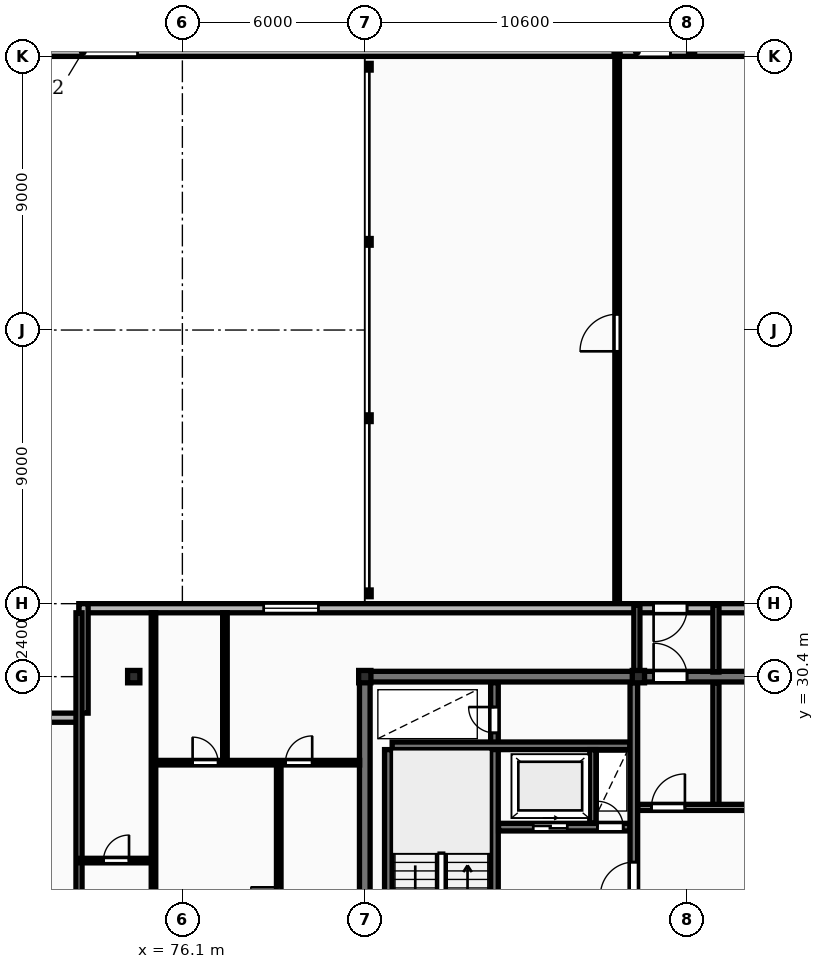
"""IFC4 building model, lengths in metres.
Left out: names, types, materials, properties, quantities, classifications, styles, units other than length and angle.
Written with IfcOpenShell. Run it as: python <this file> out.ifc"""

import sys

from ifc_helpers import new_model, si_unit, direction, frame, frame_2d, origin, origin_2d, place, context, subcontext, project, spatial, rectangle, i_section, extrude, element, fill, save


model = new_model("IFC4")
c1 = context("Model", 3, precision=1e-05, world=origin(), true_north=direction((0.0, 1.0)))
c2 = subcontext(c1, "Body", "Model", "MODEL_VIEW")
j1 = project(units=[si_unit("LENGTHUNIT", "METRE"), si_unit("PLANEANGLEUNIT", "RADIAN")], contexts=[c1])
p1 = place(None, origin())
s1 = spatial("IfcSite", under=j1, at=p1, CompositionType="ELEMENT")
p2 = place(p1, origin())
s2 = spatial("IfcBuilding", under=s1, at=p2, CompositionType="ELEMENT")
p3 = place(p2, frame((0.0, 0.0, 139.3)))
s3 = spatial("IfcBuildingStorey", under=s2, at=p3, CompositionType="ELEMENT", Elevation=139.3)
for number, where, z_axis, x_axis in (
    (1, (74.5, 30.4, 0.0), (0.0, 0.0, 1.0), (1.0, 0.0, 0.0)),
    (2, (82.1, 30.4, 0.0), (0.0, 0.0, 1.0), (1.0, 0.0, 0.0)),
    (3, (91.1, 30.4, 0.0), (0.0, 0.0, 1.0), (1.0, 0.0, 0.0)),
):
    element("IfcColumn", number, at=place(p3, frame(where, z_axis=z_axis, x_axis=x_axis)), inside=s3, PredefinedType="COLUMN", context=c2, shape_type="SweptSolid", body=[
        extrude(i_section(OverallWidth=0.403, OverallDepth=0.406, WebThickness=0.027, FlangeThickness=0.043, FilletRadius=0.015, at=origin_2d()), origin(), (0.0, 0.0, 1.0), 3.6),
    ])
p4 = place(p3, frame((57.6, 50.95, 0.0), z_axis=(0.0, 0.0, 1.0), x_axis=(1.0, 0.0, 0.0)))
e4 = element("IfcWall", 4, at=p4, inside=s3, PredefinedType="STANDARD", context=c2, shape_type="SweptSolid", body=[
    extrude(rectangle(XDim=73.0, YDim=0.3, at=frame_2d((36.5, 0.0))), origin(), (0.0, 0.0, 1.0), 3.31),
])
p5 = place(p4, frame((15.225, 0.0, 0.85)))
e5 = element("IfcOpeningElement", 5, at=p5, cuts=e4, PredefinedType="OPENING", context=c2, shape_type="SweptSolid", body=[
    extrude(rectangle(XDim=1.8, YDim=1.8, at=frame_2d((0.9, 0.9))), frame((0.0, 0.16, 0.0), z_axis=(0.0, -1.0, 0.0), x_axis=(1.0, 0.0, 0.0)), (0.0, 0.0, 1.0), 0.32),
])
p6 = place(p4, frame((58.575, 0.0, 0.85)))
e6 = element("IfcOpeningElement", 6, at=p6, cuts=e4, PredefinedType="OPENING", context=c2, shape_type="SweptSolid", body=[
    extrude(rectangle(XDim=1.8, YDim=1.8, at=frame_2d((0.9, 0.9))), frame((0.0, 0.16, 0.0), z_axis=(0.0, -1.0, 0.0), x_axis=(1.0, 0.0, 0.0)), (0.0, 0.0, 1.0), 0.32),
])
p7 = place(p4, frame((33.45, 0.0, 0.0)))
e7 = element("IfcOpeningElement", 7, at=p7, cuts=e4, PredefinedType="OPENING", context=c2, shape_type="SweptSolid", body=[
    extrude(rectangle(XDim=1.1, YDim=2.1, at=frame_2d((0.55, 1.05))), frame((0.0, 0.16, 0.0), z_axis=(0.0, -1.0, 0.0), x_axis=(1.0, 0.0, 0.0)), (0.0, 0.0, 1.0), 0.32),
])
p8 = place(p3, frame((130.7, 32.65, 0.0), z_axis=(0.0, 0.0, 1.0), x_axis=(-1.0, 0.0, 0.0)))
e8 = element("IfcWall", 8, at=p8, inside=s3, PredefinedType="STANDARD", context=c2, shape_type="SweptSolid", body=[
    extrude(rectangle(XDim=58.0, YDim=0.3, at=frame_2d((29.0, 0.0))), origin(), (0.0, 0.0, 1.0), 3.31),
])
p9 = place(p8, frame((50.125, 0.0, 0.85)))
e9 = element("IfcOpeningElement", 9, at=p9, cuts=e8, PredefinedType="OPENING", context=c2, shape_type="SweptSolid", body=[
    extrude(rectangle(XDim=1.8, YDim=1.8, at=frame_2d((0.9, 0.9))), frame((0.0, 0.16, 0.0), z_axis=(0.0, -1.0, 0.0), x_axis=(1.0, 0.0, 0.0)), (0.0, 0.0, 1.0), 0.32),
])
p10 = place(p8, frame((6.775, 0.0, 0.85)))
e10 = element("IfcOpeningElement", 10, at=p10, cuts=e8, PredefinedType="OPENING", context=c2, shape_type="SweptSolid", body=[
    extrude(rectangle(XDim=1.8, YDim=1.8, at=frame_2d((0.9, 0.9))), frame((0.0, 0.16, 0.0), z_axis=(0.0, -1.0, 0.0), x_axis=(1.0, 0.0, 0.0)), (0.0, 0.0, 1.0), 0.32),
])
p11 = place(p8, frame((38.0, 0.0, 0.0)))
e11 = element("IfcOpeningElement", 11, at=p11, cuts=e8, PredefinedType="OPENING", context=c2, shape_type="SweptSolid", body=[
    extrude(rectangle(XDim=1.1, YDim=2.1, at=frame_2d((0.55, 1.05))), frame((0.0, 0.16, 0.0), z_axis=(0.0, -1.0, 0.0), x_axis=(1.0, 0.0, 0.0)), (0.0, 0.0, 1.0), 0.32),
])
p12 = place(p3, frame((72.85, 32.8, 0.0), z_axis=(0.0, 0.0, 1.0), x_axis=(0.0, -1.0, 0.0)))
e12 = element("IfcWall", 12, at=p12, inside=s3, PredefinedType="STANDARD", context=c2, shape_type="SweptSolid", body=[
    extrude(rectangle(XDim=3.6, YDim=0.3, at=frame_2d((1.8, 0.0))), origin(), (0.0, 0.0, 1.0), 3.31),
])
p13 = place(p3, frame((72.7, 29.05, 0.0), z_axis=(0.0, 0.0, 1.0), x_axis=(-1.0, 0.0, 0.0)))
e13 = element("IfcWall", 13, at=p13, inside=s3, PredefinedType="STANDARD", context=c2, shape_type="SweptSolid", body=[
    extrude(rectangle(XDim=3.6, YDim=0.3, at=frame_2d((1.8, 0.0))), origin(), (0.0, 0.0, 1.0), 3.31),
])
for number, where, z_axis, x_axis in (
    (14, (90.4, 50.85, 0.0), (0.0, 0.0, 1.0), (0.0, 1.0, 0.0)),
    (15, (92.85, 50.85, 0.0), (0.0, 0.0, 1.0), (0.0, 1.0, 0.0)),
):
    element("IfcWall", number, at=place(p3, frame(where, z_axis=z_axis, x_axis=x_axis)), inside=s3, PredefinedType="PARTITIONING", context=c2, shape_type="SweptSolid", body=[
        extrude(rectangle(XDim=4.2, YDim=0.2, at=frame_2d((2.1, 0.0))), origin(), (0.0, 0.0, 1.0), 3.31),
    ])
p14 = place(p3, frame((81.925, 30.4, 0.0), z_axis=(0.0, 0.0, 1.0), x_axis=(1.0, 0.0, 0.0)))
e16 = element("IfcWall", 16, at=p14, inside=s3, PredefinedType="SHEAR", context=c2, shape_type="SweptSolid", body=[
    extrude(rectangle(XDim=36.265, YDim=0.35, at=frame_2d((18.132, 0.0))), origin(), (0.0, 0.0, 1.0), 3.6),
])
p15 = place(p14, frame((9.675, 0.0, 0.0)))
e17 = element("IfcOpeningElement", 17, at=p15, cuts=e16, PredefinedType="OPENING", context=c2, shape_type="SweptSolid", body=[
    extrude(rectangle(XDim=1.1, YDim=2.1, at=frame_2d((0.55, 1.05))), frame((0.0, 0.185, 0.0), z_axis=(0.0, -1.0, 0.0), x_axis=(1.0, 0.0, 0.0)), (0.0, 0.0, 1.0), 0.37),
])
p16 = place(p3, frame((82.1, 18.575, 0.0), z_axis=(0.0, 0.0, 1.0), x_axis=(0.0, 1.0, 0.0)))
e18 = element("IfcWall", 18, at=p16, inside=s3, PredefinedType="SHEAR", context=c2, shape_type="SweptSolid", body=[
    extrude(rectangle(XDim=11.65, YDim=0.35, at=frame_2d((5.825, 0.0))), origin(), (0.0, 0.0, 1.0), 3.6),
])
p17 = place(p3, frame((82.875, 20.4, 0.0), z_axis=(0.0, 0.0, 1.0), x_axis=(0.0, 1.0, 0.0)))
e19 = element("IfcWall", 19, at=p17, inside=s3, PredefinedType="SHEAR", context=c2, shape_type="SweptSolid", body=[
    extrude(rectangle(XDim=7.6, YDim=0.25, at=frame_2d((3.8, 0.0))), origin(), (0.0, 0.0, 1.0), 3.6),
])
p18 = place(p3, frame((86.365, 18.6, 0.0), z_axis=(0.0, 0.0, 1.0), x_axis=(0.0, 1.0, 0.0)))
e20 = element("IfcWall", 20, at=p18, inside=s3, PredefinedType="SHEAR", context=c2, shape_type="SweptSolid", body=[
    extrude(rectangle(XDim=11.6, YDim=0.25, at=frame_2d((5.8, 0.0))), origin(), (0.0, 0.0, 1.0), 3.6),
])
p19 = place(p18, frame((0.45, 0.0, 0.0)))
e21 = element("IfcOpeningElement", 21, at=p19, cuts=e20, PredefinedType="OPENING", context=c2, shape_type="SweptSolid", body=[
    extrude(rectangle(XDim=0.85, YDim=2.05, at=frame_2d((0.425, 1.025))), frame((0.0, 0.135, 0.0), z_axis=(0.0, -1.0, 0.0), x_axis=(1.0, 0.0, 0.0)), (0.0, 0.0, 1.0), 0.27),
])
p20 = place(p18, frame((2.05, 0.0, 0.0)))
e22 = element("IfcOpeningElement", 22, at=p20, cuts=e20, PredefinedType="OPENING", context=c2, shape_type="SweptSolid", body=[
    extrude(rectangle(XDim=1.1, YDim=2.1, at=frame_2d((0.55, 1.05))), frame((0.0, 0.135, 0.0), z_axis=(0.0, -1.0, 0.0), x_axis=(1.0, 0.0, 0.0)), (0.0, 0.0, 1.0), 0.27),
])
p21 = place(p18, frame((9.95, 0.0, 0.0)))
e23 = element("IfcOpeningElement", 23, at=p21, cuts=e20, PredefinedType="OPENING", context=c2, shape_type="SweptSolid", body=[
    extrude(rectangle(XDim=0.85, YDim=2.05, at=frame_2d((0.425, 1.025))), frame((0.0, 0.135, 0.0), z_axis=(0.0, -1.0, 0.0), x_axis=(1.0, 0.0, 0.0)), (0.0, 0.0, 1.0), 0.27),
])
p22 = place(p3, frame((83.0, 28.125, 0.0), z_axis=(0.0, 0.0, 1.0), x_axis=(1.0, 0.0, 0.0)))
e24 = element("IfcWall", 24, at=p22, inside=s3, PredefinedType="SHEAR", context=c2, shape_type="SweptSolid", body=[
    extrude(rectangle(XDim=7.82, YDim=0.25, at=frame_2d((3.91, 0.0))), origin(), (0.0, 0.0, 1.0), 3.6),
])
p23 = place(p3, frame((86.5, 25.45, 0.0), z_axis=(0.0, 0.0, 1.0), x_axis=(1.0, 0.0, 0.0)))
e25 = element("IfcWall", 25, at=p23, inside=s3, PredefinedType="SHEAR", context=c2, shape_type="SweptSolid", body=[
    extrude(rectangle(XDim=4.32, YDim=0.25, at=frame_2d((2.16, 0.0))), origin(), (0.0, 0.0, 1.0), 3.6),
])
p24 = place(p23, frame((1.14, 0.0, 0.0)))
e26 = element("IfcOpeningElement", 26, at=p24, cuts=e25, PredefinedType="OPENING", context=c2, shape_type="SweptSolid", body=[
    extrude(rectangle(XDim=1.12, YDim=2.12, at=frame_2d((0.56, 1.06))), frame((0.0, 0.135, 0.0), z_axis=(0.0, -1.0, 0.0), x_axis=(1.0, 0.0, 0.0)), (0.0, 0.0, 1.0), 0.27),
])
p25 = place(p23, frame((3.25, 0.0, 0.0)))
e27 = element("IfcOpeningElement", 27, at=p25, cuts=e25, PredefinedType="OPENING", context=c2, shape_type="SweptSolid", body=[
    extrude(rectangle(XDim=0.85, YDim=2.05, at=frame_2d((0.425, 1.025))), frame((0.0, 0.135, 0.0), z_axis=(0.0, -1.0, 0.0), x_axis=(1.0, 0.0, 0.0)), (0.0, 0.0, 1.0), 0.27),
])
p26 = place(p3, frame((89.6, 25.58, 0.0), z_axis=(0.0, 0.0, 1.0), x_axis=(0.0, 1.0, 0.0)))
e28 = element("IfcWall", 28, at=p26, inside=s3, PredefinedType="PARTITIONING", context=c2, shape_type="SweptSolid", body=[
    extrude(rectangle(XDim=2.42, YDim=0.2, at=frame_2d((1.21, 0.0))), origin(), (0.0, 0.0, 1.0), 3.31),
])
p27 = place(p3, frame((90.95, 18.6, 0.0), z_axis=(0.0, 0.0, 1.0), x_axis=(0.0, 1.0, 0.0)))
e29 = element("IfcWall", 29, at=p27, inside=s3, PredefinedType="SHEAR", context=c2, shape_type="SweptSolid", body=[
    extrude(rectangle(XDim=11.6, YDim=0.25, at=frame_2d((5.8, 0.0))), origin(), (0.0, 0.0, 1.0), 3.6),
])
p28 = place(p27, frame((4.6, 0.0, 0.0)))
e30 = element("IfcOpeningElement", 30, at=p28, cuts=e29, PredefinedType="OPENING", context=c2, shape_type="SweptSolid", body=[
    extrude(rectangle(XDim=1.1, YDim=2.1, at=frame_2d((0.55, 1.05))), frame((0.0, 0.135, 0.0), z_axis=(0.0, -1.0, 0.0), x_axis=(1.0, 0.0, 0.0)), (0.0, 0.0, 1.0), 0.27),
])
p29 = place(p3, frame((93.65, 26.1, 0.0), z_axis=(0.0, 0.0, 1.0), x_axis=(0.0, 1.0, 0.0)))
e31 = element("IfcWall", 31, at=p29, inside=s3, PredefinedType="PARTITIONING", context=c2, shape_type="SweptSolid", body=[
    extrude(rectangle(XDim=4.1, YDim=0.2, at=frame_2d((2.05, 0.0))), origin(), (0.0, 0.0, 1.0), 3.31),
])
p30 = place(p3, frame((91.08, 26.1, 0.0), z_axis=(0.0, 0.0, 1.0), x_axis=(1.0, 0.0, 0.0)))
e32 = element("IfcWall", 32, at=p30, inside=s3, PredefinedType="PARTITIONING", context=c2, shape_type="SweptSolid", body=[
    extrude(rectangle(XDim=8.34, YDim=0.2, at=frame_2d((4.17, 0.0))), origin(), (0.0, 0.0, 1.0), 3.31),
])
p31 = place(p30, frame((0.45, 0.0, 0.0)))
e33 = element("IfcOpeningElement", 33, at=p31, cuts=e32, PredefinedType="OPENING", context=c2, shape_type="SweptSolid", body=[
    extrude(rectangle(XDim=1.1, YDim=2.1, at=frame_2d((0.55, 1.05))), frame((0.0, 0.11, 0.0), z_axis=(0.0, -1.0, 0.0), x_axis=(1.0, 0.0, 0.0)), (0.0, 0.0, 1.0), 0.22),
])
p32 = place(p30, frame((4.6, 0.0, 0.0)))
e34 = element("IfcOpeningElement", 34, at=p32, cuts=e32, PredefinedType="OPENING", context=c2, shape_type="SweptSolid", body=[
    extrude(rectangle(XDim=0.92, YDim=2.08, at=frame_2d((0.46, 1.04))), frame((0.0, 0.11, 0.0), z_axis=(0.0, -1.0, 0.0), x_axis=(1.0, 0.0, 0.0)), (0.0, 0.0, 1.0), 0.22),
])
p33 = place(p3, frame((72.7, 18.4, 0.0), z_axis=(0.0, 0.0, 1.0), x_axis=(0.0, 1.0, 0.0)))
e35 = element("IfcWall", 35, at=p33, inside=s3, PredefinedType="PARTITIONING", context=c2, shape_type="SweptSolid", body=[
    extrude(rectangle(XDim=14.1, YDim=0.2, at=frame_2d((7.05, 0.0))), origin(), (0.0, 0.0, 1.0), 3.31),
])
p34 = place(p3, frame((72.7, 24.35, 0.0), z_axis=(0.0, 0.0, 1.0), x_axis=(1.0, 0.0, 0.0)))
e36 = element("IfcWall", 36, at=p34, inside=s3, PredefinedType="PARTITIONING", context=c2, shape_type="SweptSolid", body=[
    extrude(rectangle(XDim=2.45, YDim=0.15, at=frame_2d((1.225, 0.0))), origin(), (0.0, 0.0, 1.0), 3.31),
])
p35 = place(p34, frame((0.805, 0.0, 0.0)))
e37 = element("IfcOpeningElement", 37, at=p35, cuts=e36, PredefinedType="OPENING", context=c2, shape_type="SweptSolid", body=[
    extrude(rectangle(XDim=0.84, YDim=2.04, at=frame_2d((0.42, 1.02))), frame((0.0, 0.085, 0.0), z_axis=(0.0, -1.0, 0.0), x_axis=(1.0, 0.0, 0.0)), (0.0, 0.0, 1.0), 0.17),
])
p36 = place(p3, frame((75.15, 18.45, 0.0), z_axis=(0.0, 0.0, 1.0), x_axis=(0.0, 1.0, 0.0)))
e38 = element("IfcWall", 38, at=p36, inside=s3, PredefinedType="PARTITIONING", context=c2, shape_type="SweptSolid", body=[
    extrude(rectangle(XDim=14.05, YDim=0.15, at=frame_2d((7.025, 0.0))), origin(), (0.0, 0.0, 1.0), 3.31),
])
p37 = place(p36, frame((3.32, 0.0, 0.0)))
e39 = element("IfcOpeningElement", 39, at=p37, cuts=e38, PredefinedType="OPENING", context=c2, shape_type="SweptSolid", body=[
    extrude(rectangle(XDim=0.88, YDim=2.06, at=frame_2d((0.44, 1.03))), frame((0.0, 0.085, 0.0), z_axis=(0.0, -1.0, 0.0), x_axis=(1.0, 0.0, 0.0)), (0.0, 0.0, 1.0), 0.17),
])
p38 = place(p3, frame((79.27, 18.45, 0.0), z_axis=(0.0, 0.0, 1.0), x_axis=(0.0, 1.0, 0.0)))
e40 = element("IfcWall", 40, at=p38, inside=s3, PredefinedType="PARTITIONING", context=c2, shape_type="SweptSolid", body=[
    extrude(rectangle(XDim=9.12, YDim=0.15, at=frame_2d((4.56, 0.0))), origin(), (0.0, 0.0, 1.0), 3.31),
])
p39 = place(p38, frame((4.1, 0.0, 0.0)))
e41 = element("IfcOpeningElement", 41, at=p39, cuts=e40, PredefinedType="OPENING", context=c2, shape_type="SweptSolid", body=[
    extrude(rectangle(XDim=0.92, YDim=2.08, at=frame_2d((0.46, 1.04))), frame((0.0, 0.085, 0.0), z_axis=(0.0, -1.0, 0.0), x_axis=(1.0, 0.0, 0.0)), (0.0, 0.0, 1.0), 0.17),
])
p40 = place(p3, frame((77.5, 27.57, 0.0), z_axis=(0.0, 0.0, 1.0), x_axis=(0.0, 1.0, 0.0)))
e42 = element("IfcWall", 42, at=p40, inside=s3, PredefinedType="PARTITIONING", context=c2, shape_type="SweptSolid", body=[
    extrude(rectangle(XDim=4.93, YDim=0.15, at=frame_2d((2.465, 0.0))), origin(), (0.0, 0.0, 1.0), 3.31),
])
p41 = place(p3, frame((75.17, 27.57, 0.0), z_axis=(0.0, 0.0, 1.0), x_axis=(1.0, 0.0, 0.0)))
e43 = element("IfcWall", 43, at=p41, inside=s3, PredefinedType="PARTITIONING", context=c2, shape_type="SweptSolid", body=[
    extrude(rectangle(XDim=6.76, YDim=0.15, at=frame_2d((3.38, 0.0))), origin(), (0.0, 0.0, 1.0), 3.31),
])
p42 = place(p41, frame((1.266, 0.0, 0.0)))
e44 = element("IfcOpeningElement", 44, at=p42, cuts=e43, PredefinedType="OPENING", context=c2, shape_type="SweptSolid", body=[
    extrude(rectangle(XDim=0.84, YDim=2.04, at=frame_2d((0.42, 1.02))), frame((0.0, 0.085, 0.0), z_axis=(0.0, -1.0, 0.0), x_axis=(1.0, 0.0, 0.0)), (0.0, 0.0, 1.0), 0.17),
])
p43 = place(p41, frame((4.32, 0.0, 0.0)))
e45 = element("IfcOpeningElement", 45, at=p43, cuts=e43, PredefinedType="OPENING", context=c2, shape_type="SweptSolid", body=[
    extrude(rectangle(XDim=0.88, YDim=2.06, at=frame_2d((0.44, 1.03))), frame((0.0, 0.085, 0.0), z_axis=(0.0, -1.0, 0.0), x_axis=(1.0, 0.0, 0.0)), (0.0, 0.0, 1.0), 0.17),
])
p44 = place(p3, frame((91.05, 30.55, 0.0), z_axis=(0.0, 0.0, 1.0), x_axis=(0.0, 1.0, 0.0)))
e46 = element("IfcWall", 46, at=p44, inside=s3, PredefinedType="PARTITIONING", context=c2, shape_type="SweptSolid", body=[
    extrude(rectangle(XDim=2.2, YDim=0.2, at=frame_2d((1.1, 0.0))), origin(), (0.0, 0.0, 1.0), 3.31),
])
p45 = place(p3, frame((93.65, 30.55, 0.0), z_axis=(0.0, 0.0, 1.0), x_axis=(0.0, 1.0, 0.0)))
e47 = element("IfcWall", 47, at=p45, inside=s3, PredefinedType="PARTITIONING", context=c2, shape_type="SweptSolid", body=[
    extrude(rectangle(XDim=2.2, YDim=0.2, at=frame_2d((1.1, 0.0))), origin(), (0.0, 0.0, 1.0), 2.383),
])
p46 = place(p3, frame((90.4, 32.9, 0.0), z_axis=(0.0, 0.0, 1.0), x_axis=(0.0, 1.0, 0.0)))
e48 = element("IfcWall", 48, at=p46, inside=s3, PredefinedType="PARTITIONING", context=c2, shape_type="SweptSolid", body=[
    extrude(rectangle(XDim=17.8, YDim=0.15, at=frame_2d((8.9, 0.0))), origin(), (0.0, 0.0, 1.0), 3.31),
])
p47 = place(p46, frame((8.2, 0.0, 0.0)))
e49 = element("IfcOpeningElement", 49, at=p47, cuts=e48, PredefinedType="OPENING", context=c2, shape_type="SweptSolid", body=[
    extrude(rectangle(XDim=1.22, YDim=2.18, at=frame_2d((0.61, 1.09))), frame((0.0, 0.085, 0.0), z_axis=(0.0, -1.0, 0.0), x_axis=(1.0, 0.0, 0.0)), (0.0, 0.0, 1.0), 0.17),
])
p48 = place(p5, origin())
e50 = element("IfcWindow", 50, at=p48, inside=s3, PartitioningType="SINGLE_PANEL", PredefinedType="WINDOW", context=c2, shape_type="SweptSolid", body=[
    extrude(rectangle(XDim=1.8, YDim=1.8, at=frame_2d((0.9, 0.9))), frame((0.0, 0.03, 0.0), z_axis=(0.0, -1.0, 0.0), x_axis=(1.0, 0.0, 0.0)), (0.0, 0.0, 1.0), 0.06),
])
fill(e5, e50)
p49 = place(p7, origin())
e51 = element("IfcDoor", 51, at=p49, inside=s3, OperationType="SINGLE_SWING_LEFT", PredefinedType="DOOR", context=c2, shape_type="SweptSolid", body=[
    extrude(rectangle(XDim=1.1, YDim=2.1, at=frame_2d((0.55, 1.05))), frame((0.0, 0.025, 0.0), z_axis=(0.0, -1.0, 0.0), x_axis=(1.0, 0.0, 0.0)), (0.0, 0.0, 1.0), 0.05),
])
fill(e7, e51)
p50 = place(p9, origin())
e52 = element("IfcWindow", 52, at=p50, inside=s3, PartitioningType="SINGLE_PANEL", PredefinedType="WINDOW", context=c2, shape_type="SweptSolid", body=[
    extrude(rectangle(XDim=1.8, YDim=1.8, at=frame_2d((0.9, 0.9))), frame((0.0, 0.03, 0.0), z_axis=(0.0, -1.0, 0.0), x_axis=(1.0, 0.0, 0.0)), (0.0, 0.0, 1.0), 0.06),
])
fill(e9, e52)
p51 = place(p11, origin())
e53 = element("IfcDoor", 53, at=p51, inside=s3, OperationType="SINGLE_SWING_RIGHT", PredefinedType="DOOR", context=c2, shape_type="SweptSolid", body=[
    extrude(rectangle(XDim=1.1, YDim=2.1, at=frame_2d((0.55, 1.05))), frame((0.0, 0.025, 0.0), z_axis=(0.0, -1.0, 0.0), x_axis=(1.0, 0.0, 0.0)), (0.0, 0.0, 1.0), 0.05),
])
fill(e11, e53)
p52 = place(p15, origin())
e54 = element("IfcDoor", 54, at=p52, inside=s3, OperationType="SINGLE_SWING_LEFT", PredefinedType="DOOR", context=c2, shape_type="SweptSolid", body=[
    extrude(rectangle(XDim=1.1, YDim=2.1, at=frame_2d((0.55, 1.05))), frame((0.0, 0.025, 0.0), z_axis=(0.0, -1.0, 0.0), x_axis=(1.0, 0.0, 0.0)), (0.0, 0.0, 1.0), 0.05),
])
fill(e17, e54)
p53 = place(p21, origin())
e55 = element("IfcDoor", 55, at=p53, inside=s3, OperationType="SINGLE_SWING_RIGHT", PredefinedType="DOOR", context=c2, shape_type="SweptSolid", body=[
    extrude(rectangle(XDim=0.85, YDim=2.05, at=frame_2d((0.425, 1.025))), frame((0.0, 0.025, 0.0), z_axis=(0.0, -1.0, 0.0), x_axis=(1.0, 0.0, 0.0)), (0.0, 0.0, 1.0), 0.05),
])
fill(e23, e55)
p54 = place(p24, origin())
e56 = element("IfcDoor", 56, at=p54, inside=s3, OperationType="SLIDING_TO_RIGHT", PredefinedType="DOOR", context=c2, shape_type="SweptSolid", body=[
    extrude(rectangle(XDim=1.12, YDim=2.12, at=frame_2d((0.56, 1.06))), frame((0.0, 0.025, 0.0), z_axis=(0.0, -1.0, 0.0), x_axis=(1.0, 0.0, 0.0)), (0.0, 0.0, 1.0), 0.05),
])
fill(e26, e56)
p55 = place(p25, origin())
e57 = element("IfcDoor", 57, at=p55, inside=s3, OperationType="SINGLE_SWING_LEFT", PredefinedType="DOOR", context=c2, shape_type="SweptSolid", body=[
    extrude(rectangle(XDim=0.85, YDim=2.05, at=frame_2d((0.425, 1.025))), frame((0.0, 0.025, 0.0), z_axis=(0.0, -1.0, 0.0), x_axis=(1.0, 0.0, 0.0)), (0.0, 0.0, 1.0), 0.05),
])
fill(e27, e57)
p56 = place(p28, origin())
e58 = element("IfcDoor", 58, at=p56, inside=s3, OperationType="SINGLE_SWING_LEFT", PredefinedType="DOOR", context=c2, shape_type="SweptSolid", body=[
    extrude(rectangle(XDim=1.1, YDim=2.1, at=frame_2d((0.55, 1.05))), frame((0.0, 0.025, 0.0), z_axis=(0.0, -1.0, 0.0), x_axis=(1.0, 0.0, 0.0)), (0.0, 0.0, 1.0), 0.05),
])
fill(e30, e58)
p57 = place(p31, origin())
e59 = element("IfcDoor", 59, at=p57, inside=s3, OperationType="SINGLE_SWING_RIGHT", PredefinedType="DOOR", context=c2, shape_type="SweptSolid", body=[
    extrude(rectangle(XDim=1.1, YDim=2.1, at=frame_2d((0.55, 1.05))), frame((0.0, 0.025, 0.0), z_axis=(0.0, -1.0, 0.0), x_axis=(1.0, 0.0, 0.0)), (0.0, 0.0, 1.0), 0.05),
])
fill(e33, e59)
p58 = place(p35, origin())
e60 = element("IfcDoor", 60, at=p58, inside=s3, OperationType="SINGLE_SWING_RIGHT", PredefinedType="DOOR", context=c2, shape_type="SweptSolid", body=[
    extrude(rectangle(XDim=0.84, YDim=2.04, at=frame_2d((0.42, 1.02))), frame((0.0, 0.025, 0.0), z_axis=(0.0, -1.0, 0.0), x_axis=(1.0, 0.0, 0.0)), (0.0, 0.0, 1.0), 0.05),
])
fill(e37, e60)
p59 = place(p39, origin())
e61 = element("IfcDoor", 61, at=p59, inside=s3, OperationType="SINGLE_SWING_RIGHT", PredefinedType="DOOR", context=c2, shape_type="SweptSolid", body=[
    extrude(rectangle(XDim=0.92, YDim=2.08, at=frame_2d((0.46, 1.04))), frame((0.0, 0.025, 0.0), z_axis=(0.0, -1.0, 0.0), x_axis=(1.0, 0.0, 0.0)), (0.0, 0.0, 1.0), 0.05),
])
fill(e41, e61)
p60 = place(p42, origin())
e62 = element("IfcDoor", 62, at=p60, inside=s3, OperationType="SINGLE_SWING_LEFT", PredefinedType="DOOR", context=c2, shape_type="SweptSolid", body=[
    extrude(rectangle(XDim=0.84, YDim=2.04, at=frame_2d((0.42, 1.02))), frame((0.0, 0.025, 0.0), z_axis=(0.0, -1.0, 0.0), x_axis=(1.0, 0.0, 0.0)), (0.0, 0.0, 1.0), 0.05),
])
fill(e44, e62)
p61 = place(p43, origin())
e63 = element("IfcDoor", 63, at=p61, inside=s3, OperationType="SINGLE_SWING_RIGHT", PredefinedType="DOOR", context=c2, shape_type="SweptSolid", body=[
    extrude(rectangle(XDim=0.88, YDim=2.06, at=frame_2d((0.44, 1.03))), frame((0.0, 0.025, 0.0), z_axis=(0.0, -1.0, 0.0), x_axis=(1.0, 0.0, 0.0)), (0.0, 0.0, 1.0), 0.05),
])
fill(e45, e63)
p62 = place(p47, origin())
e64 = element("IfcDoor", 64, at=p62, inside=s3, OperationType="SINGLE_SWING_LEFT", PredefinedType="DOOR", context=c2, shape_type="SweptSolid", body=[
    extrude(rectangle(XDim=1.22, YDim=2.18, at=frame_2d((0.61, 1.09))), frame((0.0, 0.025, 0.0), z_axis=(0.0, -1.0, 0.0), x_axis=(1.0, 0.0, 0.0)), (0.0, 0.0, 1.0), 0.05),
])
fill(e49, e64)
save(model, sys.argv[1])
